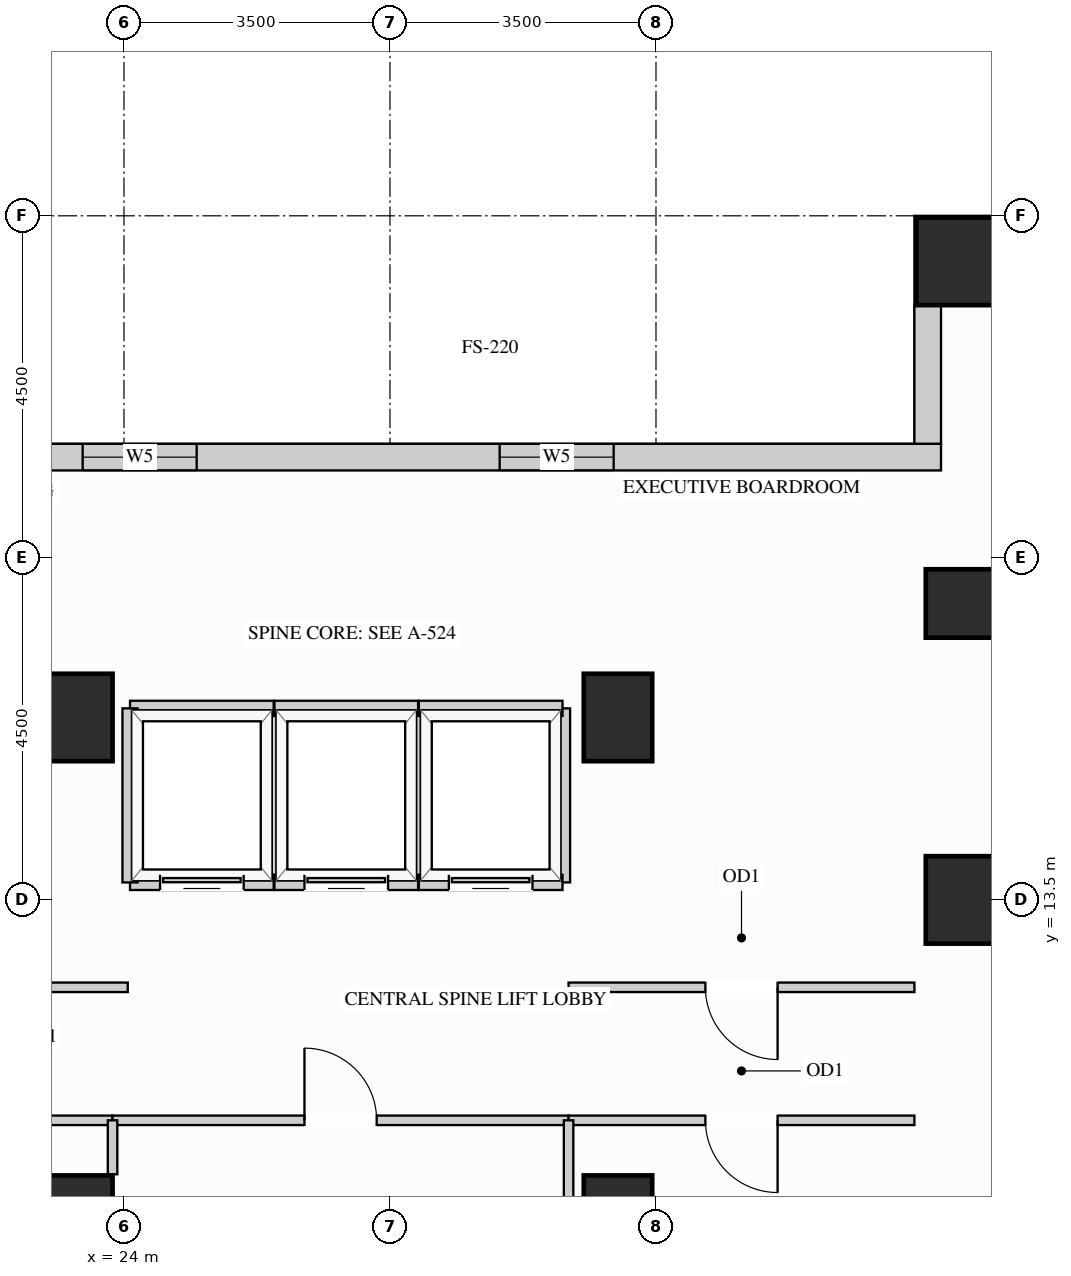
"""IFC4 building model, lengths in metres.
Left out: names, types, materials, properties, quantities, classifications, styles, units other than length and angle.
Written with IfcOpenShell. Run it as: python <this file> out.ifc"""

import sys

from ifc_helpers import new_model, si_unit, direction, frame, frame_2d, origin, origin_2d, place, context, subcontext, project, spatial, rectangle, extrude, source, transform, mapped, element, fill, save


model = new_model("IFC4")
c1 = context("Model", 3, precision=1e-05, world=origin(), true_north=direction((0.0, 1.0)))
c2 = subcontext(c1, "Body", "Model", "MODEL_VIEW")
j1 = project(units=[si_unit("LENGTHUNIT", "METRE"), si_unit("PLANEANGLEUNIT", "RADIAN")], contexts=[c1])
p1 = place(None, origin())
s1 = spatial("IfcSite", under=j1, at=p1, CompositionType="ELEMENT")
p2 = place(p1, origin())
s2 = spatial("IfcBuilding", under=s1, at=p2, CompositionType="ELEMENT")
p3 = place(p2, frame((0.0, 0.0, 88.2)))
s3 = spatial("IfcBuildingStorey", under=s2, at=p3, CompositionType="ELEMENT", Elevation=88.2)
m1 = source(origin(), c2, "Body", "SweptSolid", [
    extrude(rectangle(XDim=0.9, YDim=0.9, at=origin_2d()), origin(), (0.0, 0.0, 1.0), 3.38),
])
p4 = place(p3, frame((35.0, 17.4, 0.0), z_axis=(0.0, 0.0, 1.0), x_axis=(1.0, 0.0, 0.0)))
e1 = element("IfcColumn", 1, at=p4, inside=s3, PredefinedType="COLUMN", context=c2, shape_type="MappedRepresentation", body=[
    mapped(m1, transform((0.0, 0.0, 0.0), x_axis=(1.0, 0.0, 0.0), y_axis=(0.0, 1.0, 0.0), z_axis=(0.0, 0.0, 1.0))),
])
m2 = source(origin(), c2, "Body", "SweptSolid", [
    extrude(rectangle(XDim=0.9, YDim=1.15, at=origin_2d()), origin(), (0.0, 0.0, 1.0), 3.38),
])
for number, where, z_axis, x_axis in (
    (2, (35.0, 13.5, 0.0), (0.0, 0.0, 1.0), (1.0, 0.0, 0.0)),
    (3, (23.4, 15.9, 0.0), (0.0, 0.0, 1.0), (1.0, 0.0, 0.0)),
    (4, (23.4, 9.3, 0.0), (0.0, 0.0, 1.0), (1.0, 0.0, 0.0)),
    (5, (30.5, 15.9, 0.0), (0.0, 0.0, 1.0), (1.0, 0.0, 0.0)),
    (6, (30.5, 9.3, 0.0), (0.0, 0.0, 1.0), (1.0, 0.0, 0.0)),
):
    element("IfcColumn", number, at=place(p3, frame(where, z_axis=z_axis, x_axis=x_axis)), inside=s3, PredefinedType="COLUMN", context=c2, shape_type="MappedRepresentation", body=[
        mapped(m2, transform((0.0, 0.0, 0.0), x_axis=(1.0, 0.0, 0.0), y_axis=(0.0, 1.0, 0.0), z_axis=(0.0, 0.0, 1.0))),
    ])
m3 = source(origin(), c2, "Body", "SweptSolid", [
    extrude(rectangle(XDim=1.15, YDim=1.15, at=origin_2d()), origin(), (0.0, 0.0, 1.0), 3.38),
])
p5 = place(p3, frame((35.0, 21.9, 0.0), z_axis=(0.0, 0.0, 1.0), x_axis=(1.0, 0.0, 0.0)))
e7 = element("IfcColumn", 7, at=p5, inside=s3, PredefinedType="COLUMN", context=c2, shape_type="MappedRepresentation", body=[
    mapped(m3, transform((0.0, 0.0, 0.0), x_axis=(1.0, 0.0, 0.0), y_axis=(0.0, 1.0, 0.0), z_axis=(0.0, 0.0, 1.0))),
])
m4 = source(origin(), c2, "Body", "SweptSolid", [
    extrude(rectangle(XDim=1.829, YDim=0.35, at=frame_2d((0.915, 0.0))), origin(), (0.0, 0.0, 1.0), 3.365),
])
p6 = place(p3, frame((34.575, 21.327, 0.0), z_axis=(0.0, 0.0, 1.0), x_axis=(0.0, -1.0, 0.0)))
e8 = element("IfcWall", 8, at=p6, inside=s3, PredefinedType="SOLIDWALL", context=c2, shape_type="MappedRepresentation", body=[
    mapped(m4, transform((0.0, 0.0, 0.0), x_axis=(1.0, 0.0, 0.0), y_axis=(0.0, 1.0, 0.0), z_axis=(0.0, 0.0, 1.0))),
])
p7 = place(p3, frame((34.75, 19.325, 0.0), z_axis=(0.0, 0.0, 1.0), x_axis=(-1.0, 0.0, 0.0)))
e9 = element("IfcWall", 9, at=p7, inside=s3, PredefinedType="SOLIDWALL", context=c2, shape_type="SweptSolid", body=[
    extrude(rectangle(XDim=15.6, YDim=0.35, at=frame_2d((7.8, 0.0))), origin(), (0.0, 0.0, 1.0), 3.365),
])
p8 = place(p7, frame((4.307, 0.0, 0.78)))
e10 = element("IfcOpeningElement", 10, at=p8, cuts=e9, PredefinedType="OPENING", context=c2, shape_type="SweptSolid", body=[
    extrude(rectangle(XDim=1.5, YDim=2.0, at=frame_2d((0.75, 1.0))), frame((0.0, 0.185, 0.0), z_axis=(0.0, -1.0, 0.0), x_axis=(1.0, 0.0, 0.0)), (0.0, 0.0, 1.0), 0.37),
])
p9 = place(p7, frame((9.793, 0.0, 0.78)))
e11 = element("IfcOpeningElement", 11, at=p9, cuts=e9, PredefinedType="OPENING", context=c2, shape_type="SweptSolid", body=[
    extrude(rectangle(XDim=1.5, YDim=2.0, at=frame_2d((0.75, 1.0))), frame((0.0, 0.185, 0.0), z_axis=(0.0, -1.0, 0.0), x_axis=(1.0, 0.0, 0.0)), (0.0, 0.0, 1.0), 0.37),
])
p10 = place(p3, frame((29.85, 12.35, 0.0), z_axis=(0.0, 0.0, 1.0), x_axis=(1.0, 0.0, 0.0)))
e12 = element("IfcWall", 12, at=p10, inside=s3, PredefinedType="PARTITIONING", context=c2, shape_type="SweptSolid", body=[
    extrude(rectangle(XDim=4.55, YDim=0.125, at=frame_2d((2.275, 0.0))), origin(), (0.0, 0.0, 1.0), 3.365),
])
p11 = place(p10, frame((1.8, 0.0, 0.0)))
e13 = element("IfcOpeningElement", 13, at=p11, cuts=e12, PredefinedType="OPENING", context=c2, shape_type="SweptSolid", body=[
    extrude(rectangle(XDim=0.95, YDim=2.15, at=frame_2d((0.475, 1.075))), frame((0.0, 0.073, 0.0), z_axis=(0.0, -1.0, 0.0), x_axis=(1.0, 0.0, 0.0)), (0.0, 0.0, 1.0), 0.145),
])
p12 = place(p3, frame((19.5, 12.35, 0.0), z_axis=(0.0, 0.0, 1.0), x_axis=(1.0, 0.0, 0.0)))
e14 = element("IfcWall", 14, at=p12, inside=s3, PredefinedType="PARTITIONING", context=c2, shape_type="SweptSolid", body=[
    extrude(rectangle(XDim=4.55, YDim=0.125, at=frame_2d((2.275, 0.0))), origin(), (0.0, 0.0, 1.0), 3.365),
])
p13 = place(p12, frame((1.8, 0.0, 0.0)))
e15 = element("IfcOpeningElement", 15, at=p13, cuts=e14, PredefinedType="OPENING", context=c2, shape_type="SweptSolid", body=[
    extrude(rectangle(XDim=0.95, YDim=2.15, at=frame_2d((0.475, 1.075))), frame((0.0, 0.073, 0.0), z_axis=(0.0, -1.0, 0.0), x_axis=(1.0, 0.0, 0.0)), (0.0, 0.0, 1.0), 0.145),
])
p14 = place(p3, frame((19.5, 10.6, 0.0), z_axis=(0.0, 0.0, 1.0), x_axis=(1.0, 0.0, 0.0)))
e16 = element("IfcWall", 16, at=p14, inside=s3, PredefinedType="PARTITIONING", context=c2, shape_type="SweptSolid", body=[
    extrude(rectangle(XDim=4.35, YDim=0.125, at=frame_2d((2.175, 0.0))), origin(), (0.0, 0.0, 1.0), 3.365),
])
p15 = place(p14, frame((1.7, 0.0, 0.0)))
e17 = element("IfcOpeningElement", 17, at=p15, cuts=e16, PredefinedType="OPENING", context=c2, shape_type="SweptSolid", body=[
    extrude(rectangle(XDim=0.95, YDim=2.15, at=frame_2d((0.475, 1.075))), frame((0.0, 0.073, 0.0), z_axis=(0.0, -1.0, 0.0), x_axis=(1.0, 0.0, 0.0)), (0.0, 0.0, 1.0), 0.145),
])
p16 = place(p3, frame((23.85, 10.6, 0.0), z_axis=(0.0, 0.0, 1.0), x_axis=(1.0, 0.0, 0.0)))
e18 = element("IfcWall", 18, at=p16, inside=s3, PredefinedType="PARTITIONING", context=c2, shape_type="SweptSolid", body=[
    extrude(rectangle(XDim=6.0, YDim=0.125, at=frame_2d((3.0, 0.0))), origin(), (0.0, 0.0, 1.0), 3.365),
])
p17 = place(p16, frame((2.525, 0.0, 0.0)))
e19 = element("IfcOpeningElement", 19, at=p17, cuts=e18, PredefinedType="OPENING", context=c2, shape_type="SweptSolid", body=[
    extrude(rectangle(XDim=0.95, YDim=2.15, at=frame_2d((0.475, 1.075))), frame((0.0, 0.073, 0.0), z_axis=(0.0, -1.0, 0.0), x_axis=(1.0, 0.0, 0.0)), (0.0, 0.0, 1.0), 0.145),
])
p18 = place(p3, frame((29.85, 10.6, 0.0), z_axis=(0.0, 0.0, 1.0), x_axis=(1.0, 0.0, 0.0)))
e20 = element("IfcWall", 20, at=p18, inside=s3, PredefinedType="PARTITIONING", context=c2, shape_type="SweptSolid", body=[
    extrude(rectangle(XDim=4.55, YDim=0.125, at=frame_2d((2.275, 0.0))), origin(), (0.0, 0.0, 1.0), 3.365),
])
p19 = place(p18, frame((1.8, 0.0, 0.0)))
e21 = element("IfcOpeningElement", 21, at=p19, cuts=e20, PredefinedType="OPENING", context=c2, shape_type="SweptSolid", body=[
    extrude(rectangle(XDim=0.95, YDim=2.15, at=frame_2d((0.475, 1.075))), frame((0.0, 0.073, 0.0), z_axis=(0.0, -1.0, 0.0), x_axis=(1.0, 0.0, 0.0)), (0.0, 0.0, 1.0), 0.145),
])
m5 = source(origin(), c2, "Body", "SweptSolid", [
    extrude(rectangle(XDim=0.71, YDim=0.125, at=frame_2d((0.355, 0.0))), origin(), (0.0, 0.0, 1.0), 3.365),
])
p20 = place(p3, frame((23.85, 9.89, 0.0), z_axis=(0.0, 0.0, 1.0), x_axis=(0.0, 1.0, 0.0)))
e22 = element("IfcWall", 22, at=p20, inside=s3, PredefinedType="PARTITIONING", context=c2, shape_type="MappedRepresentation", body=[
    mapped(m5, transform((0.0, 0.0, 0.0), x_axis=(1.0, 0.0, 0.0), y_axis=(0.0, 1.0, 0.0), z_axis=(0.0, 0.0, 1.0))),
])
m6 = source(origin(), c2, "Body", "SweptSolid", [
    extrude(rectangle(XDim=1.748, YDim=0.125, at=frame_2d((0.874, 0.0))), origin(), (0.0, 0.0, 1.0), 3.365),
])
p21 = place(p3, frame((29.85, 8.852, 0.0), z_axis=(0.0, 0.0, 1.0), x_axis=(0.0, 1.0, 0.0)))
e23 = element("IfcWall", 23, at=p21, inside=s3, PredefinedType="PARTITIONING", context=c2, shape_type="MappedRepresentation", body=[
    mapped(m6, transform((0.0, 0.0, 0.0), x_axis=(1.0, 0.0, 0.0), y_axis=(0.0, 1.0, 0.0), z_axis=(0.0, 0.0, 1.0))),
])
m7 = source(origin(), c2, "Body", "SweptSolid", [
    extrude(rectangle(XDim=2.29, YDim=0.2, at=frame_2d((1.145, 0.0))), origin(), (0.0, 0.0, 1.0), 3.365),
])
p22 = place(p3, frame((25.97, 13.73, 0.0), z_axis=(0.0, 0.0, 1.0), x_axis=(0.0, 1.0, 0.0)))
e24 = element("IfcWall", 24, at=p22, inside=s3, PredefinedType="PARTITIONING", context=c2, shape_type="MappedRepresentation", body=[
    mapped(m7, transform((0.0, 0.0, 0.0), x_axis=(1.0, 0.0, 0.0), y_axis=(0.0, 1.0, 0.0), z_axis=(0.0, 0.0, 1.0))),
])
m8 = source(origin(), c2, "Body", "SweptSolid", [
    extrude(rectangle(XDim=1.89, YDim=0.2, at=frame_2d((0.945, 0.0))), origin(), (0.0, 0.0, 1.0), 2.677),
])
p23 = place(p3, frame((24.08, 16.02, 0.0), z_axis=(0.0, 0.0, 1.0), x_axis=(1.0, 0.0, 0.0)))
e25 = element("IfcWall", 25, at=p23, inside=s3, PredefinedType="PARTITIONING", context=c2, shape_type="MappedRepresentation", body=[
    mapped(m8, transform((0.0, 0.0, 0.0), x_axis=(1.0, 0.0, 0.0), y_axis=(0.0, 1.0, 0.0), z_axis=(0.0, 0.0, 1.0))),
])
p24 = place(p3, frame((24.08, 13.73, 0.0), z_axis=(0.0, 0.0, 1.0), x_axis=(1.0, 0.0, 0.0)))
e26 = element("IfcWall", 26, at=p24, inside=s3, PredefinedType="PARTITIONING", context=c2, shape_type="SweptSolid", body=[
    extrude(rectangle(XDim=1.89, YDim=0.2, at=frame_2d((0.945, 0.0))), origin(), (0.0, 0.0, 1.0), 2.446),
])
p25 = place(p24, frame((0.395, 0.0, 0.0)))
e27 = element("IfcOpeningElement", 27, at=p25, cuts=e26, PredefinedType="OPENING", context=c2, shape_type="SweptSolid", body=[
    extrude(rectangle(XDim=1.1, YDim=2.2, at=frame_2d((0.55, 1.1))), frame((0.0, 0.11, 0.0), z_axis=(0.0, -1.0, 0.0), x_axis=(1.0, 0.0, 0.0)), (0.0, 0.0, 1.0), 0.22),
])
for number, where, z_axis, x_axis in (
    (28, (24.08, 13.73, 0.0), (0.0, 0.0, 1.0), (0.0, 1.0, 0.0)),
    (29, (27.87, 13.73, 0.0), (0.0, 0.0, 1.0), (0.0, 1.0, 0.0)),
):
    element("IfcWall", number, at=place(p3, frame(where, z_axis=z_axis, x_axis=x_axis)), inside=s3, PredefinedType="PARTITIONING", context=c2, shape_type="MappedRepresentation", body=[
        mapped(m7, transform((0.0, 0.0, 0.0), x_axis=(1.0, 0.0, 0.0), y_axis=(0.0, 1.0, 0.0), z_axis=(0.0, 0.0, 1.0))),
    ])
m9 = source(origin(), c2, "Body", "SweptSolid", [
    extrude(rectangle(XDim=1.89, YDim=0.2, at=frame_2d((0.945, 0.0))), origin(), (0.0, 0.0, 1.0), 2.677),
])
p26 = place(p3, frame((25.98, 16.02, 0.0), z_axis=(0.0, 0.0, 1.0), x_axis=(1.0, 0.0, 0.0)))
e30 = element("IfcWall", 30, at=p26, inside=s3, PredefinedType="PARTITIONING", context=c2, shape_type="MappedRepresentation", body=[
    mapped(m9, transform((0.0, 0.0, 0.0), x_axis=(1.0, 0.0, 0.0), y_axis=(0.0, 1.0, 0.0), z_axis=(0.0, 0.0, 1.0))),
])
p27 = place(p3, frame((25.98, 13.73, 0.0), z_axis=(0.0, 0.0, 1.0), x_axis=(1.0, 0.0, 0.0)))
e31 = element("IfcWall", 31, at=p27, inside=s3, PredefinedType="PARTITIONING", context=c2, shape_type="SweptSolid", body=[
    extrude(rectangle(XDim=1.89, YDim=0.2, at=frame_2d((0.945, 0.0))), origin(), (0.0, 0.0, 1.0), 2.446),
])
p28 = place(p27, frame((0.395, 0.0, 0.0)))
e32 = element("IfcOpeningElement", 32, at=p28, cuts=e31, PredefinedType="OPENING", context=c2, shape_type="SweptSolid", body=[
    extrude(rectangle(XDim=1.1, YDim=2.2, at=frame_2d((0.55, 1.1))), frame((0.0, 0.11, 0.0), z_axis=(0.0, -1.0, 0.0), x_axis=(1.0, 0.0, 0.0)), (0.0, 0.0, 1.0), 0.22),
])
p29 = place(p3, frame((29.77, 13.73, 0.0), z_axis=(0.0, 0.0, 1.0), x_axis=(0.0, 1.0, 0.0)))
e33 = element("IfcWall", 33, at=p29, inside=s3, PredefinedType="PARTITIONING", context=c2, shape_type="MappedRepresentation", body=[
    mapped(m7, transform((0.0, 0.0, 0.0), x_axis=(1.0, 0.0, 0.0), y_axis=(0.0, 1.0, 0.0), z_axis=(0.0, 0.0, 1.0))),
])
p30 = place(p3, frame((27.88, 16.02, 0.0), z_axis=(0.0, 0.0, 1.0), x_axis=(1.0, 0.0, 0.0)))
e34 = element("IfcWall", 34, at=p30, inside=s3, PredefinedType="PARTITIONING", context=c2, shape_type="MappedRepresentation", body=[
    mapped(m9, transform((0.0, 0.0, 0.0), x_axis=(1.0, 0.0, 0.0), y_axis=(0.0, 1.0, 0.0), z_axis=(0.0, 0.0, 1.0))),
])
p31 = place(p3, frame((27.88, 13.73, 0.0), z_axis=(0.0, 0.0, 1.0), x_axis=(1.0, 0.0, 0.0)))
e35 = element("IfcWall", 35, at=p31, inside=s3, PredefinedType="PARTITIONING", context=c2, shape_type="SweptSolid", body=[
    extrude(rectangle(XDim=1.89, YDim=0.2, at=frame_2d((0.945, 0.0))), origin(), (0.0, 0.0, 1.0), 2.446),
])
p32 = place(p31, frame((0.395, 0.0, 0.0)))
e36 = element("IfcOpeningElement", 36, at=p32, cuts=e35, PredefinedType="OPENING", context=c2, shape_type="SweptSolid", body=[
    extrude(rectangle(XDim=1.1, YDim=2.2, at=frame_2d((0.55, 1.1))), frame((0.0, 0.11, 0.0), z_axis=(0.0, -1.0, 0.0), x_axis=(1.0, 0.0, 0.0)), (0.0, 0.0, 1.0), 0.22),
])
m10 = source(origin(), c2, "Body", "SweptSolid", [
    extrude(rectangle(XDim=1.1, YDim=2.2, at=frame_2d((0.55, 1.1))), frame((0.0, 0.025, 0.0), z_axis=(0.0, -1.0, 0.0), x_axis=(1.0, 0.0, 0.0)), (0.0, 0.0, 1.0), 0.05),
])
p33 = place(p25, origin())
e37 = element("IfcDoor", 37, at=p33, inside=s3, OperationType="SLIDING_TO_LEFT", PredefinedType="DOOR", context=c2, shape_type="MappedRepresentation", body=[
    mapped(m10, transform((0.0, 0.0, 0.0), x_axis=(1.0, 0.0, 0.0), y_axis=(0.0, 1.0, 0.0), z_axis=(0.0, 0.0, 1.0))),
])
fill(e27, e37)
p34 = place(p28, origin())
e38 = element("IfcDoor", 38, at=p34, inside=s3, OperationType="SLIDING_TO_LEFT", PredefinedType="DOOR", context=c2, shape_type="MappedRepresentation", body=[
    mapped(m10, transform((0.0, 0.0, 0.0), x_axis=(1.0, 0.0, 0.0), y_axis=(0.0, 1.0, 0.0), z_axis=(0.0, 0.0, 1.0))),
])
fill(e32, e38)
p35 = place(p32, origin())
e39 = element("IfcDoor", 39, at=p35, inside=s3, OperationType="SLIDING_TO_LEFT", PredefinedType="DOOR", context=c2, shape_type="MappedRepresentation", body=[
    mapped(m10, transform((0.0, 0.0, 0.0), x_axis=(1.0, 0.0, 0.0), y_axis=(0.0, 1.0, 0.0), z_axis=(0.0, 0.0, 1.0))),
])
fill(e36, e39)
m11 = source(origin(), c2, "Body", "SweptSolid", [
    extrude(rectangle(XDim=0.95, YDim=2.15, at=frame_2d((0.475, 1.075))), frame((0.0, 0.025, 0.0), z_axis=(0.0, -1.0, 0.0), x_axis=(1.0, 0.0, 0.0)), (0.0, 0.0, 1.0), 0.05),
])
p36 = place(p11, origin())
e40 = element("IfcDoor", 40, at=p36, inside=s3, OperationType="SINGLE_SWING_RIGHT", PredefinedType="DOOR", context=c2, shape_type="MappedRepresentation", body=[
    mapped(m11, transform((0.0, 0.0, 0.0), x_axis=(1.0, 0.0, 0.0), y_axis=(0.0, 1.0, 0.0), z_axis=(0.0, 0.0, 1.0))),
])
fill(e13, e40)
p37 = place(p17, origin())
e41 = element("IfcDoor", 41, at=p37, inside=s3, OperationType="SINGLE_SWING_LEFT", PredefinedType="DOOR", context=c2, shape_type="MappedRepresentation", body=[
    mapped(m11, transform((0.0, 0.0, 0.0), x_axis=(1.0, 0.0, 0.0), y_axis=(0.0, 1.0, 0.0), z_axis=(0.0, 0.0, 1.0))),
])
fill(e19, e41)
p38 = place(p19, origin())
e42 = element("IfcDoor", 42, at=p38, inside=s3, OperationType="SINGLE_SWING_RIGHT", PredefinedType="DOOR", context=c2, shape_type="MappedRepresentation", body=[
    mapped(m11, transform((0.0, 0.0, 0.0), x_axis=(1.0, 0.0, 0.0), y_axis=(0.0, 1.0, 0.0), z_axis=(0.0, 0.0, 1.0))),
])
fill(e21, e42)
m12 = source(origin(), c2, "Body", "SweptSolid", [
    extrude(rectangle(XDim=1.5, YDim=2.0, at=frame_2d((0.75, 1.0))), frame((0.0, 0.03, 0.0), z_axis=(0.0, -1.0, 0.0), x_axis=(1.0, 0.0, 0.0)), (0.0, 0.0, 1.0), 0.06),
])
p39 = place(p8, origin())
e43 = element("IfcWindow", 43, at=p39, inside=s3, PartitioningType="SINGLE_PANEL", PredefinedType="WINDOW", context=c2, shape_type="MappedRepresentation", body=[
    mapped(m12, transform((0.0, 0.0, 0.0), x_axis=(1.0, 0.0, 0.0), y_axis=(0.0, 1.0, 0.0), z_axis=(0.0, 0.0, 1.0))),
])
fill(e10, e43)
p40 = place(p9, origin())
e44 = element("IfcWindow", 44, at=p40, inside=s3, PartitioningType="SINGLE_PANEL", PredefinedType="WINDOW", context=c2, shape_type="MappedRepresentation", body=[
    mapped(m12, transform((0.0, 0.0, 0.0), x_axis=(1.0, 0.0, 0.0), y_axis=(0.0, 1.0, 0.0), z_axis=(0.0, 0.0, 1.0))),
])
fill(e11, e44)
save(model, sys.argv[1])
